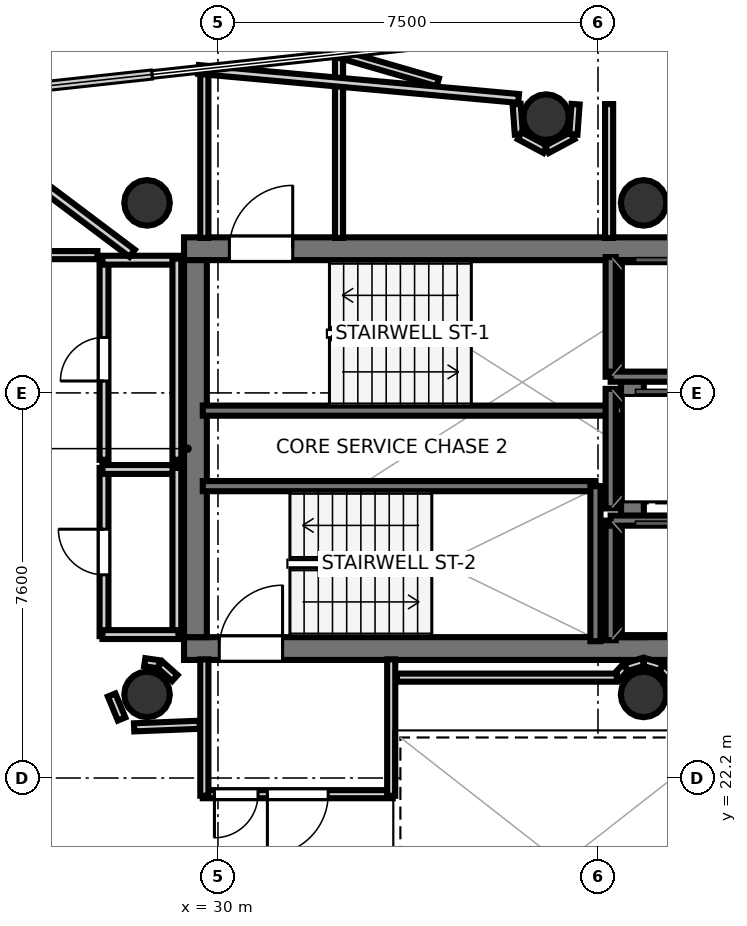
"""IFC4 building model, lengths in metres.
Left out: names, types, materials, properties, quantities, classifications, styles, units other than length and angle.
Written with IfcOpenShell. Run it as: python <this file> out.ifc"""

import sys

from ifc_helpers import new_model, si_unit, direction, frame, frame_2d, origin, origin_2d, place, context, subcontext, project, spatial, rectangle, hollow_circle, extrude, element, fill, save


model = new_model("IFC4")
c1 = context("Model", 3, precision=1e-05, world=origin(), true_north=direction((0.0, 1.0)))
c2 = subcontext(c1, "Body", "Model", "MODEL_VIEW")
j1 = project(units=[si_unit("LENGTHUNIT", "METRE"), si_unit("PLANEANGLEUNIT", "RADIAN")], contexts=[c1])
p1 = place(None, origin())
s1 = spatial("IfcSite", under=j1, at=p1, CompositionType="ELEMENT")
p2 = place(p1, origin())
s2 = spatial("IfcBuilding", under=s1, at=p2, CompositionType="ELEMENT")
p3 = place(p2, frame((0.0, 0.0, 280.6)))
s3 = spatial("IfcBuildingStorey", under=s2, at=p3, CompositionType="ELEMENT", Elevation=280.6)
p4 = place(p3, frame((29.33, 32.645, 0.0), z_axis=(0.0, 0.0, 1.0), x_axis=(1.0, 0.0, 0.0)))
e1 = element("IfcWall", 1, at=p4, inside=s3, PredefinedType="SHEAR", context=c2, shape_type="SweptSolid", body=[
    extrude(rectangle(XDim=10.52, YDim=0.45, at=frame_2d((5.26, 0.0))), origin(), (0.0, 0.0, 1.0), 3.52),
])
p5 = place(p4, frame((0.895, 0.0, 0.0)))
e2 = element("IfcOpeningElement", 2, at=p5, cuts=e1, PredefinedType="OPENING", context=c2, shape_type="SweptSolid", body=[
    extrude(rectangle(XDim=1.25, YDim=2.15, at=frame_2d((0.625, 1.075))), frame((0.0, 0.235, 0.0), z_axis=(0.0, -1.0, 0.0), x_axis=(1.0, 0.0, 0.0)), (0.0, 0.0, 1.0), 0.47),
])
p6 = place(p3, frame((29.33, 24.755, 0.0), z_axis=(0.0, 0.0, 1.0), x_axis=(1.0, 0.0, 0.0)))
e3 = element("IfcWall", 3, at=p6, inside=s3, PredefinedType="SHEAR", context=c2, shape_type="SweptSolid", body=[
    extrude(rectangle(XDim=10.52, YDim=0.45, at=frame_2d((5.26, 0.0))), origin(), (0.0, 0.0, 1.0), 3.52),
])
p7 = place(p6, frame((0.695, 0.0, 0.0)))
e4 = element("IfcOpeningElement", 4, at=p7, cuts=e3, PredefinedType="OPENING", context=c2, shape_type="SweptSolid", body=[
    extrude(rectangle(XDim=1.25, YDim=2.15, at=frame_2d((0.625, 1.075))), frame((0.0, 0.235, 0.0), z_axis=(0.0, -1.0, 0.0), x_axis=(1.0, 0.0, 0.0)), (0.0, 0.0, 1.0), 0.47),
])
for number, where, z_axis, x_axis in (
    (5, (29.555, 24.98, 0.0), (0.0, 0.0, 1.0), (0.0, 1.0, 0.0)),
    (6, (38.18, 24.98, 0.0), (0.0, 0.0, 1.0), (0.0, 1.0, 0.0)),
):
    element("IfcWall", number, at=place(p3, frame(where, z_axis=z_axis, x_axis=x_axis)), inside=s3, PredefinedType="SHEAR", context=c2, shape_type="SweptSolid", body=[
        extrude(rectangle(XDim=7.44, YDim=0.45, at=frame_2d((3.72, 0.0))), origin(), (0.0, 0.0, 1.0), 3.52),
    ])
for number, where, z_axis, x_axis in (
    (7, (28.6, 33.55, 0.0), (0.0, 0.0, 1.0), (1.0, 0.0, 0.0)),
    (8, (28.6, 23.85, 0.0), (0.0, 0.0, 1.0), (1.0, 0.0, 0.0)),
    (9, (38.4, 33.55, 0.0), (0.0, 0.0, 1.0), (1.0, 0.0, 0.0)),
    (10, (38.4, 23.85, 0.0), (0.0, 0.0, 1.0), (1.0, 0.0, 0.0)),
):
    element("IfcColumn", number, at=place(p3, frame(where, z_axis=z_axis, x_axis=x_axis)), inside=s3, PredefinedType="COLUMN", context=c2, shape_type="SweptSolid", body=[
        extrude(hollow_circle(Radius=0.45, WallThickness=0.025, at=origin_2d()), origin(), (0.0, 0.0, 1.0), 3.7),
    ])
p8 = place(p3, frame((36.476, 35.243, -0.23), z_axis=(0.0, 0.0, 1.0), x_axis=(1.0, 0.0, 0.0)))
e11 = element("IfcColumn", 11, at=p8, inside=s3, PredefinedType="COLUMN", context=c2, shape_type="SweptSolid", body=[
    extrude(hollow_circle(Radius=0.45, WallThickness=0.025, at=origin_2d()), origin(), (0.0, 0.0, 1.0), 3.93),
])
p9 = place(p3, frame((29.7, 29.45, 0.0), z_axis=(0.0, 0.0, 1.0), x_axis=(1.0, 0.0, 0.0)))
e12 = element("IfcWall", 12, at=p9, inside=s3, PredefinedType="SOLIDWALL", context=c2, shape_type="SweptSolid", body=[
    extrude(rectangle(XDim=8.3, YDim=0.2, at=frame_2d((4.15, 0.0))), origin(), (0.0, 0.0, 1.0), 3.52),
])
p10 = place(p3, frame((29.7, 27.96, 0.0), z_axis=(0.0, 0.0, 1.0), x_axis=(1.0, 0.0, 0.0)))
e13 = element("IfcWall", 13, at=p10, inside=s3, PredefinedType="SOLIDWALL", context=c2, shape_type="SweptSolid", body=[
    extrude(rectangle(XDim=7.75, YDim=0.2, at=frame_2d((3.875, 0.0))), origin(), (0.0, 0.0, 1.0), 3.52),
])
p11 = place(p3, frame((37.45, 24.9, 0.0), z_axis=(0.0, 0.0, 1.0), x_axis=(0.0, 1.0, 0.0)))
e14 = element("IfcWall", 14, at=p11, inside=s3, PredefinedType="SOLIDWALL", context=c2, shape_type="SweptSolid", body=[
    extrude(rectangle(XDim=3.06, YDim=0.2, at=frame_2d((1.53, 0.0))), origin(), (0.0, 0.0, 1.0), 3.52),
])
p12 = place(p3, frame((37.75, 30.12, 0.0), z_axis=(0.0, 0.0, 1.0), x_axis=(0.0, 1.0, 0.0)))
e15 = element("IfcWall", 15, at=p12, inside=s3, PredefinedType="SOLIDWALL", context=c2, shape_type="SweptSolid", body=[
    extrude(rectangle(XDim=2.36, YDim=0.2, at=frame_2d((1.18, 0.0))), origin(), (0.0, 0.0, 1.0), 3.52),
])
p13 = place(p3, frame((37.75, 30.12, 0.0), z_axis=(0.0, 0.0, 1.0), x_axis=(1.0, 0.0, 0.0)))
e16 = element("IfcWall", 16, at=p13, inside=s3, PredefinedType="SOLIDWALL", context=c2, shape_type="SweptSolid", body=[
    extrude(rectangle(XDim=2.1, YDim=0.2, at=frame_2d((1.05, 0.0))), origin(), (0.0, 0.0, 1.0), 3.52),
])
p14 = place(p3, frame((37.75, 24.92, 0.0), z_axis=(0.0, 0.0, 1.0), x_axis=(0.0, 1.0, 0.0)))
e17 = element("IfcWall", 17, at=p14, inside=s3, PredefinedType="SOLIDWALL", context=c2, shape_type="SweptSolid", body=[
    extrude(rectangle(XDim=2.36, YDim=0.2, at=frame_2d((1.18, 0.0))), origin(), (0.0, 0.0, 1.0), 3.52),
])
p15 = place(p3, frame((37.75, 27.28, 0.0), z_axis=(0.0, 0.0, 1.0), x_axis=(1.0, 0.0, 0.0)))
e18 = element("IfcWall", 18, at=p15, inside=s3, PredefinedType="SOLIDWALL", context=c2, shape_type="SweptSolid", body=[
    extrude(rectangle(XDim=2.1, YDim=0.2, at=frame_2d((1.05, 0.0))), origin(), (0.0, 0.0, 1.0), 3.52),
])
p16 = place(p3, frame((37.75, 27.52, 0.0), z_axis=(0.0, 0.0, 1.0), x_axis=(0.0, 1.0, 0.0)))
e19 = element("IfcWall", 19, at=p16, inside=s3, PredefinedType="SOLIDWALL", context=c2, shape_type="SweptSolid", body=[
    extrude(rectangle(XDim=2.36, YDim=0.2, at=frame_2d((1.18, 0.0))), origin(), (0.0, 0.0, 1.0), 3.52),
])
p17 = place(p3, frame((29.731, 32.858, 0.0), z_axis=(0.0, 0.0, 1.0), x_axis=(0.0, 1.0, 0.0)))
e20 = element("IfcWall", 20, at=p17, inside=s3, PredefinedType="PARTITIONING", context=c2, shape_type="SweptSolid", body=[
    extrude(rectangle(XDim=3.357, YDim=0.16, at=frame_2d((1.679, 0.0))), origin(), (0.0, 0.0, 1.0), 2.84),
])
p18 = place(p3, frame((32.389, 36.504, 0.0), z_axis=(0.0, 0.0, 1.0), x_axis=(0.0, -1.0, 0.0)))
e21 = element("IfcWall", 21, at=p18, inside=s3, PredefinedType="PARTITIONING", context=c2, shape_type="SweptSolid", body=[
    extrude(rectangle(XDim=3.646, YDim=0.16, at=frame_2d((1.823, 0.0))), origin(), (0.0, 0.0, 1.0), 2.84),
])
p19 = place(p3, frame((33.45, 21.881, 0.0), z_axis=(0.0, 0.0, 1.0), x_axis=(-1.0, 0.0, 0.0)))
e22 = element("IfcWall", 22, at=p19, inside=s3, PredefinedType="PARTITIONING", context=c2, shape_type="SweptSolid", body=[
    extrude(rectangle(XDim=3.75, YDim=0.16, at=frame_2d((1.875, 0.0))), origin(), (0.0, 0.0, 1.0), 2.84),
])
p20 = place(p19, frame((1.275, 0.0, 0.0)))
e23 = element("IfcOpeningElement", 23, at=p20, cuts=e22, PredefinedType="OPENING", context=c2, shape_type="SweptSolid", body=[
    extrude(rectangle(XDim=1.2, YDim=2.15, at=frame_2d((0.6, 1.075))), frame((0.0, 0.09, 0.0), z_axis=(0.0, -1.0, 0.0), x_axis=(1.0, 0.0, 0.0)), (0.0, 0.0, 1.0), 0.18),
])
p21 = place(p19, frame((2.66, 0.0, 0.0)))
e24 = element("IfcOpeningElement", 24, at=p21, cuts=e22, PredefinedType="OPENING", context=c2, shape_type="SweptSolid", body=[
    extrude(rectangle(XDim=0.86, YDim=2.05, at=frame_2d((0.43, 1.025))), frame((0.0, 0.09, 0.0), z_axis=(0.0, -1.0, 0.0), x_axis=(1.0, 0.0, 0.0)), (0.0, 0.0, 1.0), 0.18),
])
for number, where, z_axis, x_axis in (
    (25, (29.731, 21.85, 0.0), (0.0, 0.0, 1.0), (0.0, 1.0, 0.0)),
    (26, (33.419, 24.542, 0.0), (0.0, 0.0, 1.0), (0.0, -1.0, 0.0)),
):
    element("IfcWall", number, at=place(p3, frame(where, z_axis=z_axis, x_axis=x_axis)), inside=s3, PredefinedType="PARTITIONING", context=c2, shape_type="SweptSolid", body=[
        extrude(rectangle(XDim=2.692, YDim=0.16, at=frame_2d((1.346, 0.0))), origin(), (0.0, 0.0, 1.0), 2.84),
    ])
p22 = place(p3, frame((27.751, 25.0, 0.0), z_axis=(0.0, 0.0, 1.0), x_axis=(0.0, 1.0, 0.0)))
e27 = element("IfcWall", 27, at=p22, inside=s3, PredefinedType="PLUMBINGWALL", context=c2, shape_type="SweptSolid", body=[
    extrude(rectangle(XDim=3.32, YDim=0.175, at=frame_2d((1.66, 0.0))), origin(), (0.0, 0.0, 1.0), 2.84),
])
p23 = place(p22, frame((1.21, 0.0, 0.0)))
e28 = element("IfcOpeningElement", 28, at=p23, cuts=e27, PredefinedType="OPENING", context=c2, shape_type="SweptSolid", body=[
    extrude(rectangle(XDim=0.9, YDim=2.1, at=frame_2d((0.45, 1.05))), frame((0.0, 0.097, 0.0), z_axis=(0.0, -1.0, 0.0), x_axis=(1.0, 0.0, 0.0)), (0.0, 0.0, 1.0), 0.195),
])
p24 = place(p3, frame((27.72, 28.289, 0.0), z_axis=(0.0, 0.0, 1.0), x_axis=(1.0, 0.0, 0.0)))
e29 = element("IfcWall", 29, at=p24, inside=s3, PredefinedType="PLUMBINGWALL", context=c2, shape_type="SweptSolid", body=[
    extrude(rectangle(XDim=1.5, YDim=0.175, at=frame_2d((0.75, 0.0))), origin(), (0.0, 0.0, 1.0), 2.84),
])
p25 = place(p3, frame((29.189, 28.32, 0.0), z_axis=(0.0, 0.0, 1.0), x_axis=(0.0, -1.0, 0.0)))
e30 = element("IfcWall", 30, at=p25, inside=s3, PredefinedType="PLUMBINGWALL", context=c2, shape_type="SweptSolid", body=[
    extrude(rectangle(XDim=3.32, YDim=0.175, at=frame_2d((1.66, 0.0))), origin(), (0.0, 0.0, 1.0), 2.84),
])
p26 = place(p3, frame((29.22, 25.031, 0.0), z_axis=(0.0, 0.0, 1.0), x_axis=(-1.0, 0.0, 0.0)))
e31 = element("IfcWall", 31, at=p26, inside=s3, PredefinedType="PLUMBINGWALL", context=c2, shape_type="SweptSolid", body=[
    extrude(rectangle(XDim=1.5, YDim=0.175, at=frame_2d((0.75, 0.0))), origin(), (0.0, 0.0, 1.0), 2.84),
])
p27 = place(p3, frame((27.751, 28.48, 0.0), z_axis=(0.0, 0.0, 1.0), x_axis=(0.0, 1.0, 0.0)))
e32 = element("IfcWall", 32, at=p27, inside=s3, PredefinedType="PLUMBINGWALL", context=c2, shape_type="SweptSolid", body=[
    extrude(rectangle(XDim=3.97, YDim=0.175, at=frame_2d((1.985, 0.0))), origin(), (0.0, 0.0, 1.0), 2.84),
])
p28 = place(p27, frame((1.555, 0.0, 0.0)))
e33 = element("IfcOpeningElement", 33, at=p28, cuts=e32, PredefinedType="OPENING", context=c2, shape_type="SweptSolid", body=[
    extrude(rectangle(XDim=0.86, YDim=2.05, at=frame_2d((0.43, 1.025))), frame((0.0, 0.097, 0.0), z_axis=(0.0, -1.0, 0.0), x_axis=(1.0, 0.0, 0.0)), (0.0, 0.0, 1.0), 0.195),
])
p29 = place(p3, frame((27.72, 32.419, 0.0), z_axis=(0.0, 0.0, 1.0), x_axis=(1.0, 0.0, 0.0)))
e34 = element("IfcWall", 34, at=p29, inside=s3, PredefinedType="PLUMBINGWALL", context=c2, shape_type="SweptSolid", body=[
    extrude(rectangle(XDim=1.5, YDim=0.175, at=frame_2d((0.75, 0.0))), origin(), (0.0, 0.0, 1.0), 2.84),
])
p30 = place(p3, frame((29.189, 32.45, 0.0), z_axis=(0.0, 0.0, 1.0), x_axis=(0.0, -1.0, 0.0)))
e35 = element("IfcWall", 35, at=p30, inside=s3, PredefinedType="PLUMBINGWALL", context=c2, shape_type="SweptSolid", body=[
    extrude(rectangle(XDim=3.97, YDim=0.175, at=frame_2d((1.985, 0.0))), origin(), (0.0, 0.0, 1.0), 2.84),
])
p31 = place(p3, frame((38.951, 24.171, 0.0), z_axis=(0.0, 0.0, 1.0), x_axis=(-0.674186852077, 0.738560822469, 0.0)))
e36 = element("IfcWall", 36, at=p31, inside=s3, PredefinedType="PARTITIONING", context=c2, shape_type="SweptSolid", body=[
    extrude(rectangle(XDim=0.281, YDim=0.16, at=frame_2d((0.14, 0.0))), origin(), (0.0, 0.0, 1.0), 2.84),
])
p32 = place(p3, frame((38.748, 24.387, 0.0), z_axis=(0.0, 0.0, 1.0), x_axis=(-0.956948991291, 0.290256142171, 0.0)))
e37 = element("IfcWall", 37, at=p32, inside=s3, PredefinedType="PARTITIONING", context=c2, shape_type="SweptSolid", body=[
    extrude(rectangle(XDim=0.354, YDim=0.16, at=frame_2d((0.177, 0.0))), origin(), (0.0, 0.0, 1.0), 2.84),
])
p33 = place(p3, frame((38.391, 24.49, 0.0), z_axis=(0.0, 0.0, 1.0), x_axis=(-0.957007018611, -0.290064762301, 0.0)))
e38 = element("IfcWall", 38, at=p33, inside=s3, PredefinedType="PARTITIONING", context=c2, shape_type="SweptSolid", body=[
    extrude(rectangle(XDim=0.354, YDim=0.16, at=frame_2d((0.177, 0.0))), origin(), (0.0, 0.0, 1.0), 2.84),
])
p34 = place(p3, frame((38.038, 24.378, 0.0), z_axis=(0.0, 0.0, 1.0), x_axis=(-0.673658387955, -0.739042878551, 0.0)))
e39 = element("IfcWall", 39, at=p34, inside=s3, PredefinedType="PARTITIONING", context=c2, shape_type="SweptSolid", body=[
    extrude(rectangle(XDim=0.246, YDim=0.16, at=frame_2d((0.123, 0.0))), origin(), (0.0, 0.0, 1.0), 2.84),
])
p35 = place(p3, frame((37.872, 24.181, 0.0), z_axis=(0.0, 0.0, 1.0), x_axis=(-1.0, 0.0, 0.0)))
e40 = element("IfcWall", 40, at=p35, inside=s3, PredefinedType="PARTITIONING", context=c2, shape_type="SweptSolid", body=[
    extrude(rectangle(XDim=4.342, YDim=0.16, at=frame_2d((2.171, 0.0))), origin(), (0.0, 0.0, 1.0), 2.84),
])
p36 = place(p3, frame((29.149, 24.173, 0.0), z_axis=(0.0, 0.0, 1.0), x_axis=(-0.745225165416, 0.666812906917, 0.0)))
e41 = element("IfcWall", 41, at=p36, inside=s3, PredefinedType="PARTITIONING", context=c2, shape_type="SweptSolid", body=[
    extrude(rectangle(XDim=0.396, YDim=0.16, at=frame_2d((0.198, 0.0))), origin(), (0.0, 0.0, 1.0), 2.84),
])
p37 = place(p3, frame((28.838, 24.444, 0.0), z_axis=(0.0, 0.0, 1.0), x_axis=(-0.989449148305, 0.144880581578, 0.0)))
e42 = element("IfcWall", 42, at=p37, inside=s3, PredefinedType="PARTITIONING", context=c2, shape_type="SweptSolid", body=[
    extrude(rectangle(XDim=0.286, YDim=0.16, at=frame_2d((0.143, 0.0))), origin(), (0.0, 0.0, 1.0), 2.84),
])
p38 = place(p3, frame((32.409, 36.487, 0.0), z_axis=(0.0, 0.0, 1.0), x_axis=(0.960545465506, -0.278123010007, 0.0)))
e43 = element("IfcWall", 43, at=p38, inside=s3, PredefinedType="PARTITIONING", context=c2, shape_type="SweptSolid", body=[
    extrude(rectangle(XDim=2.009, YDim=0.16, at=frame_2d((1.004, 0.0))), origin(), (0.0, 0.0, 1.0), 2.84),
])
p39 = place(p3, frame((35.894, 35.498, 0.0), z_axis=(0.0, 0.0, 1.0), x_axis=(0.07354059826, -0.997292224179, 0.0)))
e44 = element("IfcWall", 44, at=p39, inside=s3, PredefinedType="PARTITIONING", context=c2, shape_type="SweptSolid", body=[
    extrude(rectangle(XDim=0.598, YDim=0.16, at=frame_2d((0.299, 0.0))), origin(), (0.0, 0.0, 1.0), 2.84),
])
for number, where, z_axis, x_axis in (
    (45, (35.954, 34.877, 0.0), (0.0, 0.0, 1.0), (0.882, -0.471, 0.0)),
    (46, (36.49, 34.606, 0.0), (0.0, 0.0, 1.0), (0.882, 0.471, 0.0)),
):
    element("IfcWall", number, at=place(p3, frame(where, z_axis=z_axis, x_axis=x_axis)), inside=s3, PredefinedType="PARTITIONING", context=c2, shape_type="SweptSolid", body=[
        extrude(rectangle(XDim=0.575, YDim=0.16, at=frame_2d((0.288, 0.0))), origin(), (0.0, 0.0, 1.0), 2.84),
    ])
p40 = place(p3, frame((37.014, 34.902, 0.0), z_axis=(0.0, 0.0, 1.0), x_axis=(0.073134230676, 0.997322106595, 0.0)))
e47 = element("IfcWall", 47, at=p40, inside=s3, PredefinedType="PARTITIONING", context=c2, shape_type="SweptSolid", body=[
    extrude(rectangle(XDim=0.598, YDim=0.16, at=frame_2d((0.299, 0.0))), origin(), (0.0, 0.0, 1.0), 2.84),
])
p41 = place(p3, frame((37.719, 35.5, 0.0), z_axis=(0.0, 0.0, 1.0), x_axis=(0.0, -1.0, 0.0)))
e48 = element("IfcWall", 48, at=p41, inside=s3, PredefinedType="PARTITIONING", context=c2, shape_type="SweptSolid", body=[
    extrude(rectangle(XDim=2.642, YDim=0.16, at=frame_2d((1.321, 0.0))), origin(), (0.0, 0.0, 1.0), 2.84),
])
p42 = place(p3, frame((27.901, 23.838, 0.0), z_axis=(0.0, 0.0, 1.0), x_axis=(0.382856448334, -0.923807847969, 0.0)))
e49 = element("IfcWall", 49, at=p42, inside=s3, PredefinedType="PARTITIONING", context=c2, shape_type="SweptSolid", body=[
    extrude(rectangle(XDim=0.513, YDim=0.16, at=frame_2d((0.256, 0.0))), origin(), (0.0, 0.0, 1.0), 2.84),
])
p43 = place(p3, frame((28.345, 23.2, 0.0), z_axis=(0.0, 0.0, 1.0), x_axis=(0.999216536924, 0.039576664043, 0.0)))
e50 = element("IfcWall", 50, at=p43, inside=s3, PredefinedType="PARTITIONING", context=c2, shape_type="SweptSolid", body=[
    extrude(rectangle(XDim=1.295, YDim=0.16, at=frame_2d((0.648, 0.0))), origin(), (0.0, 0.0, 1.0), 2.84),
])
p44 = place(p3, frame((25.65, 32.519, 0.0), z_axis=(0.0, 0.0, 1.0), x_axis=(1.0, 0.0, 0.0)))
e51 = element("IfcWall", 51, at=p44, inside=s3, PredefinedType="PARTITIONING", context=c2, shape_type="SweptSolid", body=[
    extrude(rectangle(XDim=1.97, YDim=0.16, at=frame_2d((0.985, 0.0))), origin(), (0.0, 0.0, 1.0), 2.84),
])
p45 = place(p3, frame((26.964, 17.015, 0.0), z_axis=(0.0, 0.0, 1.0), x_axis=(-0.508423474714, 0.861107177046, 0.0)))
e52 = element("IfcWall", 52, at=p45, inside=s3, PredefinedType="PARTITIONING", context=c2, shape_type="SweptSolid", body=[
    extrude(rectangle(XDim=12.265, YDim=0.105, at=frame_2d((6.133, 0.0))), origin(), (0.0, 0.0, 1.0), 2.84),
])
p46 = place(p3, frame((35.933, 35.611, 0.0), z_axis=(0.0, 0.0, 1.0), x_axis=(-0.995921239294, 0.090226853666, 0.0)))
e53 = element("IfcWall", 53, at=p46, inside=s3, PredefinedType="PLUMBINGWALL", context=c2, shape_type="SweptSolid", body=[
    extrude(rectangle(XDim=6.343, YDim=0.175, at=frame_2d((3.171, 0.0))), origin(), (0.0, 0.0, 1.0), 2.84),
])
p47 = place(p3, frame((28.307, 32.555, 0.0), z_axis=(0.0, 0.0, 1.0), x_axis=(-0.799198697227, 0.601066920027, 0.0)))
e54 = element("IfcWall", 54, at=p47, inside=s3, PredefinedType="PLUMBINGWALL", context=c2, shape_type="SweptSolid", body=[
    extrude(rectangle(XDim=5.087, YDim=0.175, at=frame_2d((2.543, 0.0))), origin(), (0.0, 0.0, 1.0), 2.84),
])
p48 = place(p5, origin())
e55 = element("IfcDoor", 55, at=p48, inside=s3, OperationType="SINGLE_SWING_RIGHT", PredefinedType="DOOR", context=c2, shape_type="SweptSolid", body=[
    extrude(rectangle(XDim=1.25, YDim=2.15, at=frame_2d((0.625, 1.075))), frame((0.0, 0.025, 0.0), z_axis=(0.0, -1.0, 0.0), x_axis=(1.0, 0.0, 0.0)), (0.0, 0.0, 1.0), 0.05),
])
fill(e2, e55)
p49 = place(p7, origin())
e56 = element("IfcDoor", 56, at=p49, inside=s3, OperationType="SINGLE_SWING_RIGHT", PredefinedType="DOOR", context=c2, shape_type="SweptSolid", body=[
    extrude(rectangle(XDim=1.25, YDim=2.15, at=frame_2d((0.625, 1.075))), frame((0.0, 0.025, 0.0), z_axis=(0.0, -1.0, 0.0), x_axis=(1.0, 0.0, 0.0)), (0.0, 0.0, 1.0), 0.05),
])
fill(e4, e56)
p50 = place(p20, origin())
e57 = element("IfcDoor", 57, at=p50, inside=s3, OperationType="SINGLE_SWING_RIGHT", PredefinedType="DOOR", context=c2, shape_type="SweptSolid", body=[
    extrude(rectangle(XDim=1.2, YDim=2.15, at=frame_2d((0.6, 1.075))), frame((0.0, 0.025, 0.0), z_axis=(0.0, -1.0, 0.0), x_axis=(1.0, 0.0, 0.0)), (0.0, 0.0, 1.0), 0.05),
])
fill(e23, e57)
p51 = place(p23, origin())
e58 = element("IfcDoor", 58, at=p51, inside=s3, OperationType="SINGLE_SWING_RIGHT", PredefinedType="DOOR", context=c2, shape_type="SweptSolid", body=[
    extrude(rectangle(XDim=0.9, YDim=2.1, at=frame_2d((0.45, 1.05))), frame((0.0, 0.025, 0.0), z_axis=(0.0, -1.0, 0.0), x_axis=(1.0, 0.0, 0.0)), (0.0, 0.0, 1.0), 0.05),
])
fill(e28, e58)
p52 = place(p28, origin())
e59 = element("IfcDoor", 59, at=p52, inside=s3, OperationType="SINGLE_SWING_LEFT", PredefinedType="DOOR", context=c2, shape_type="SweptSolid", body=[
    extrude(rectangle(XDim=0.86, YDim=2.05, at=frame_2d((0.43, 1.025))), frame((0.0, 0.025, 0.0), z_axis=(0.0, -1.0, 0.0), x_axis=(1.0, 0.0, 0.0)), (0.0, 0.0, 1.0), 0.05),
])
fill(e33, e59)
p53 = place(p21, origin())
e60 = element("IfcDoor", 60, at=p53, inside=s3, OperationType="SINGLE_SWING_RIGHT", PredefinedType="DOOR", context=c2, shape_type="SweptSolid", body=[
    extrude(rectangle(XDim=0.86, YDim=2.05, at=frame_2d((0.43, 1.025))), frame((0.0, 0.025, 0.0), z_axis=(0.0, -1.0, 0.0), x_axis=(1.0, 0.0, 0.0)), (0.0, 0.0, 1.0), 0.05),
])
fill(e24, e60)
save(model, sys.argv[1])
